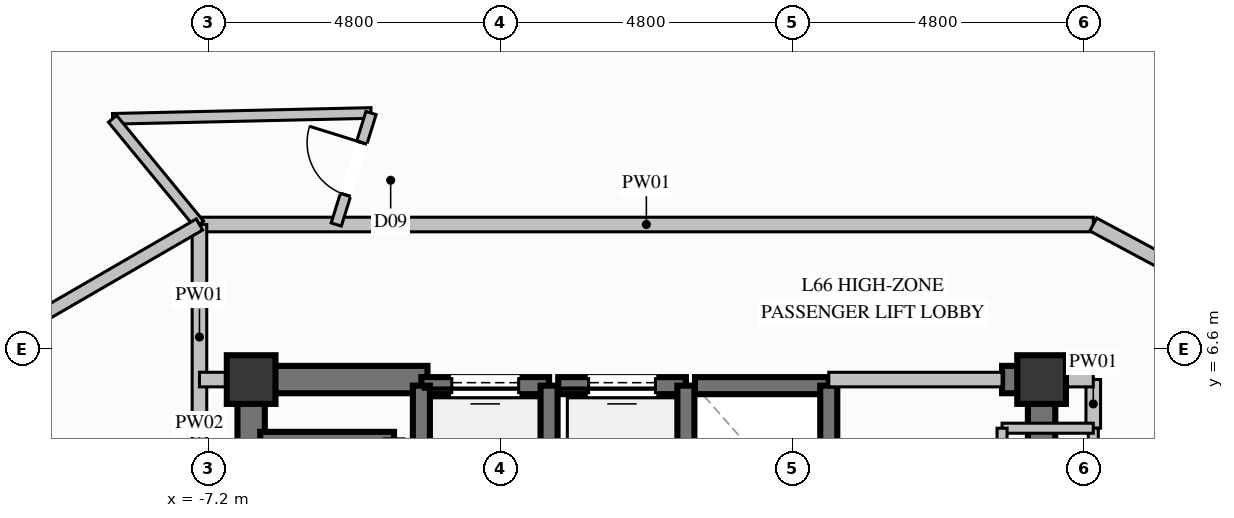
"""IFC4 building model, lengths in metres.
Left out: names, types, materials, properties, quantities, classifications, styles, units other than length and angle.
Written with IfcOpenShell. Run it as: python <this file> out.ifc"""

import sys

from ifc_helpers import new_model, si_unit, direction, frame, frame_2d, origin, origin_2d, place, context, subcontext, project, spatial, rectangle, extrude, element, fill, save


model = new_model("IFC4")
c1 = context("Model", 3, precision=1e-05, world=origin(), true_north=direction((0.0, 1.0)))
c2 = subcontext(c1, "Body", "Model", "MODEL_VIEW")
j1 = project(units=[si_unit("LENGTHUNIT", "METRE"), si_unit("PLANEANGLEUNIT", "RADIAN")], contexts=[c1])
p1 = place(None, origin())
s1 = spatial("IfcSite", under=j1, at=p1, CompositionType="ELEMENT")
p2 = place(p1, origin())
s2 = spatial("IfcBuilding", under=s1, at=p2, CompositionType="ELEMENT")
p3 = place(p2, frame((0.0, 0.0, 254.4)))
s3 = spatial("IfcBuildingStorey", under=s2, at=p3, CompositionType="ELEMENT", Elevation=254.4)
for number, where, z_axis, x_axis in (
    (1, (6.5, 6.1, 0.0), (0.0, 0.0, 1.0), (1.0, 0.0, 0.0)),
    (2, (-6.5, 6.1, 0.0), (0.0, 0.0, 1.0), (1.0, 0.0, 0.0)),
):
    element("IfcColumn", number, at=place(p3, frame(where, z_axis=z_axis, x_axis=x_axis)), inside=s3, PredefinedType="COLUMN", context=c2, shape_type="SweptSolid", body=[
        extrude(rectangle(XDim=0.8, YDim=0.8, at=origin_2d()), origin(), (0.0, 0.0, 1.0), 3.8),
    ])
p4 = place(p3, frame((-6.275, 6.1, 0.0), z_axis=(0.0, 0.0, 1.0), x_axis=(1.0, 0.0, 0.0)))
e3 = element("IfcWall", 3, at=p4, inside=s3, PredefinedType="SHEAR", context=c2, shape_type="SweptSolid", body=[
    extrude(rectangle(XDim=2.675, YDim=0.45, at=frame_2d((1.337, 0.0))), origin(), (0.0, 0.0, 1.0), 3.8),
])
p5 = place(p3, frame((5.85, 6.1, 0.0), z_axis=(0.0, 0.0, 1.0), x_axis=(1.0, 0.0, 0.0)))
e4 = element("IfcWall", 4, at=p5, inside=s3, PredefinedType="SHEAR", context=c2, shape_type="SweptSolid", body=[
    extrude(rectangle(XDim=0.425, YDim=0.45, at=frame_2d((0.212, 0.0))), origin(), (0.0, 0.0, 1.0), 3.8),
])
p6 = place(p3, frame((-6.5, 2.35, 0.0), z_axis=(0.0, 0.0, 1.0), x_axis=(0.0, 1.0, 0.0)))
e5 = element("IfcWall", 5, at=p6, inside=s3, PredefinedType="SHEAR", context=c2, shape_type="SweptSolid", body=[
    extrude(rectangle(XDim=3.975, YDim=0.45, at=frame_2d((1.987, 0.0))), origin(), (0.0, 0.0, 1.0), 3.8),
])
p7 = place(p3, frame((6.5, 3.35, 0.0), z_axis=(0.0, 0.0, 1.0), x_axis=(0.0, 1.0, 0.0)))
e6 = element("IfcWall", 6, at=p7, inside=s3, PredefinedType="SHEAR", context=c2, shape_type="SweptSolid", body=[
    extrude(rectangle(XDim=2.975, YDim=0.45, at=frame_2d((1.487, 0.0))), origin(), (0.0, 0.0, 1.0), 3.8),
])
p8 = place(p3, frame((-1.6, 6.0, 0.0), z_axis=(0.0, 0.0, 1.0), x_axis=(-1.0, 0.0, 0.0)))
e7 = element("IfcWall", 7, at=p8, inside=s3, PredefinedType="SOLIDWALL", context=c2, shape_type="SweptSolid", body=[
    extrude(rectangle(XDim=2.1, YDim=0.28, at=frame_2d((1.05, 0.0))), origin(), (0.0, 0.0, 1.0), 3.57),
])
p9 = place(p8, frame((0.5, 0.0, 0.0)))
e8 = element("IfcOpeningElement", 8, at=p9, cuts=e7, PredefinedType="OPENING", context=c2, shape_type="SweptSolid", body=[
    extrude(rectangle(XDim=1.1, YDim=2.2, at=frame_2d((0.55, 1.1))), frame((0.0, 0.15, 0.0), z_axis=(0.0, -1.0, 0.0), x_axis=(1.0, 0.0, 0.0)), (0.0, 0.0, 1.0), 0.3),
])
for number, where, z_axis, x_axis in (
    (9, (-3.7, 6.0, 0.0), (0.0, 0.0, 1.0), (0.0, -1.0, 0.0)),
    (10, (-1.6, 3.5, 0.0), (0.0, 0.0, 1.0), (0.0, 1.0, 0.0)),
):
    element("IfcWall", number, at=place(p3, frame(where, z_axis=z_axis, x_axis=x_axis)), inside=s3, PredefinedType="SOLIDWALL", context=c2, shape_type="SweptSolid", body=[
        extrude(rectangle(XDim=2.5, YDim=0.28, at=frame_2d((1.25, 0.0))), origin(), (0.0, 0.0, 1.0), 3.57),
    ])
p10 = place(p3, frame((0.65, 6.0, 0.0), z_axis=(0.0, 0.0, 1.0), x_axis=(-1.0, 0.0, 0.0)))
e11 = element("IfcWall", 11, at=p10, inside=s3, PredefinedType="SOLIDWALL", context=c2, shape_type="SweptSolid", body=[
    extrude(rectangle(XDim=2.1, YDim=0.28, at=frame_2d((1.05, 0.0))), origin(), (0.0, 0.0, 1.0), 3.57),
])
p11 = place(p10, frame((0.5, 0.0, 0.0)))
e12 = element("IfcOpeningElement", 12, at=p11, cuts=e11, PredefinedType="OPENING", context=c2, shape_type="SweptSolid", body=[
    extrude(rectangle(XDim=1.1, YDim=2.2, at=frame_2d((0.55, 1.1))), frame((0.0, 0.15, 0.0), z_axis=(0.0, -1.0, 0.0), x_axis=(1.0, 0.0, 0.0)), (0.0, 0.0, 1.0), 0.3),
])
p12 = place(p3, frame((0.65, 3.5, 0.0), z_axis=(0.0, 0.0, 1.0), x_axis=(0.0, 1.0, 0.0)))
e13 = element("IfcWall", 13, at=p12, inside=s3, PredefinedType="SOLIDWALL", context=c2, shape_type="SweptSolid", body=[
    extrude(rectangle(XDim=2.5, YDim=0.28, at=frame_2d((1.25, 0.0))), origin(), (0.0, 0.0, 1.0), 3.57),
])
p13 = place(p3, frame((3.0, 6.0, 0.0), z_axis=(0.0, 0.0, 1.0), x_axis=(-1.0, 0.0, 0.0)))
e14 = element("IfcWall", 14, at=p13, inside=s3, PredefinedType="SOLIDWALL", context=c2, shape_type="SweptSolid", body=[
    extrude(rectangle(XDim=2.2, YDim=0.28, at=frame_2d((1.1, 0.0))), origin(), (0.0, 0.0, 1.0), 3.57),
])
p14 = place(p3, frame((3.0, 3.5, 0.0), z_axis=(0.0, 0.0, 1.0), x_axis=(0.0, 1.0, 0.0)))
e15 = element("IfcWall", 15, at=p14, inside=s3, PredefinedType="SOLIDWALL", context=c2, shape_type="SweptSolid", body=[
    extrude(rectangle(XDim=2.5, YDim=0.28, at=frame_2d((1.25, 0.0))), origin(), (0.0, 0.0, 1.0), 3.57),
])
p15 = place(p3, frame((-4.15, 5.1, 0.0), z_axis=(0.0, 0.0, 1.0), x_axis=(-1.0, 0.0, 0.0)))
e16 = element("IfcWall", 16, at=p15, inside=s3, PredefinedType="SOLIDWALL", context=c2, shape_type="SweptSolid", body=[
    extrude(rectangle(XDim=2.2, YDim=0.28, at=frame_2d((1.1, 0.0))), origin(), (0.0, 0.0, 1.0), 3.57),
])
p16 = place(p3, frame((-7.35, 8.65, 0.0), z_axis=(0.0, 0.0, 1.0), x_axis=(1.0, 0.0, 0.0)))
e17 = element("IfcWall", 17, at=p16, inside=s3, PredefinedType="PARTITIONING", context=c2, shape_type="SweptSolid", body=[
    extrude(rectangle(XDim=14.7, YDim=0.24, at=frame_2d((7.35, 0.0))), origin(), (0.0, 0.0, 1.0), 3.57),
])
p17 = place(p3, frame((3.0, 6.1, 0.0), z_axis=(0.0, 0.0, 1.0), x_axis=(1.0, 0.0, 0.0)))
e18 = element("IfcWall", 18, at=p17, inside=s3, PredefinedType="PARTITIONING", context=c2, shape_type="SweptSolid", body=[
    extrude(rectangle(XDim=2.85, YDim=0.24, at=frame_2d((1.425, 0.0))), origin(), (0.0, 0.0, 1.0), 2.655),
])
p18 = place(p3, frame((7.35, 5.3, 0.0), z_axis=(0.0, 0.0, 1.0), x_axis=(0.0, 1.0, 0.0)))
e19 = element("IfcWall", 19, at=p18, inside=s3, PredefinedType="PARTITIONING", context=c2, shape_type="SweptSolid", body=[
    extrude(rectangle(XDim=0.8, YDim=0.24, at=frame_2d((0.4, 0.0))), origin(), (0.0, 0.0, 1.0), 2.655),
])
p19 = place(p3, frame((6.5, 6.1, 0.0), z_axis=(0.0, 0.0, 1.0), x_axis=(1.0, 0.0, 0.0)))
e20 = element("IfcWall", 20, at=p19, inside=s3, PredefinedType="PARTITIONING", context=c2, shape_type="SweptSolid", body=[
    extrude(rectangle(XDim=0.85, YDim=0.24, at=frame_2d((0.425, 0.0))), origin(), (0.0, 0.0, 1.0), 3.011),
])
p20 = place(p3, frame((-7.35, 4.95, 0.0), z_axis=(0.0, 0.0, 1.0), x_axis=(0.0, 1.0, 0.0)))
e21 = element("IfcWall", 21, at=p20, inside=s3, PredefinedType="PARTITIONING", context=c2, shape_type="SweptSolid", body=[
    extrude(rectangle(XDim=3.7, YDim=0.24, at=frame_2d((1.85, 0.0))), origin(), (0.0, 0.0, 1.0), 2.655),
])
p21 = place(p3, frame((-7.35, 6.1, 0.0), z_axis=(0.0, 0.0, 1.0), x_axis=(1.0, 0.0, 0.0)))
e22 = element("IfcWall", 22, at=p21, inside=s3, PredefinedType="PARTITIONING", context=c2, shape_type="SweptSolid", body=[
    extrude(rectangle(XDim=0.85, YDim=0.24, at=frame_2d((0.425, 0.0))), origin(), (0.0, 0.0, 1.0), 3.011),
])
p22 = place(p3, frame((7.35, 3.35, 0.0), z_axis=(0.0, 0.0, 1.0), x_axis=(0.0, 1.0, 0.0)))
e23 = element("IfcWall", 23, at=p22, inside=s3, PredefinedType="PARTITIONING", context=c2, shape_type="SweptSolid", body=[
    extrude(rectangle(XDim=1.95, YDim=0.165, at=frame_2d((0.975, 0.0))), origin(), (0.0, 0.0, 1.0), 3.57),
])
p23 = place(p22, frame((0.5, 0.0, 0.0)))
e24 = element("IfcOpeningElement", 24, at=p23, cuts=e23, PredefinedType="OPENING", context=c2, shape_type="SweptSolid", body=[
    extrude(rectangle(XDim=0.95, YDim=2.1, at=frame_2d((0.475, 1.05))), frame((0.0, 0.093, 0.0), z_axis=(0.0, -1.0, 0.0), x_axis=(1.0, 0.0, 0.0)), (0.0, 0.0, 1.0), 0.185),
])
p24 = place(p3, frame((7.35, 5.3, 0.0), z_axis=(0.0, 0.0, 1.0), x_axis=(-1.0, 0.0, 0.0)))
e25 = element("IfcWall", 25, at=p24, inside=s3, PredefinedType="PARTITIONING", context=c2, shape_type="SweptSolid", body=[
    extrude(rectangle(XDim=1.5, YDim=0.165, at=frame_2d((0.75, 0.0))), origin(), (0.0, 0.0, 1.0), 2.655),
])
p25 = place(p3, frame((5.85, 5.3, 0.0), z_axis=(0.0, 0.0, 1.0), x_axis=(0.0, -1.0, 0.0)))
e26 = element("IfcWall", 26, at=p25, inside=s3, PredefinedType="PARTITIONING", context=c2, shape_type="SweptSolid", body=[
    extrude(rectangle(XDim=1.95, YDim=0.165, at=frame_2d((0.975, 0.0))), origin(), (0.0, 0.0, 1.0), 2.655),
])
p26 = place(p3, frame((-8.779, 10.388, 0.0), z_axis=(0.0, 0.0, 1.0), x_axis=(0.999745380364, 0.022564894009, 0.0)))
e27 = element("IfcWall", 27, at=p26, inside=s3, PredefinedType="PLUMBINGWALL", context=c2, shape_type="SweptSolid", body=[
    extrude(rectangle(XDim=4.252, YDim=0.175, at=frame_2d((2.126, 0.0))), origin(), (0.0, 0.0, 1.0), 3.57),
])
p27 = place(p3, frame((-8.779, 10.388, 0.0), z_axis=(0.0, 0.0, 1.0), x_axis=(0.635079503828, -0.772446777337, 0.0)))
e28 = element("IfcWall", 28, at=p27, inside=s3, PredefinedType="PLUMBINGWALL", context=c2, shape_type="SweptSolid", body=[
    extrude(rectangle(XDim=2.25, YDim=0.175, at=frame_2d((1.125, 0.0))), origin(), (0.0, 0.0, 1.0), 3.57),
])
p28 = place(p3, frame((-5.1, 8.65, 0.0), z_axis=(0.0, 0.0, 1.0), x_axis=(0.297753956274, 0.95464264598, 0.0)))
e29 = element("IfcWall", 29, at=p28, inside=s3, PredefinedType="PLUMBINGWALL", context=c2, shape_type="SweptSolid", body=[
    extrude(rectangle(XDim=1.921, YDim=0.175, at=frame_2d((0.96, 0.0))), origin(), (0.0, 0.0, 1.0), 3.57),
])
p29 = place(p28, frame((0.511, 0.0, 0.0)))
e30 = element("IfcOpeningElement", 30, at=p29, cuts=e29, PredefinedType="OPENING", context=c2, shape_type="SweptSolid", body=[
    extrude(rectangle(XDim=0.9, YDim=2.1, at=frame_2d((0.45, 1.05))), frame((0.0, 0.098, 0.0), z_axis=(0.0, -1.0, 0.0), x_axis=(1.0, 0.0, 0.0)), (0.0, 0.0, 1.0), 0.195),
])
p30 = place(p3, frame((-11.065, 6.5, 0.0), z_axis=(0.0, 0.0, 1.0), x_axis=(0.865506757898, 0.50089724698, 0.0)))
e31 = element("IfcWall", 31, at=p30, inside=s3, PredefinedType="PARTITIONING", context=c2, shape_type="SweptSolid", body=[
    extrude(rectangle(XDim=4.292, YDim=0.21, at=frame_2d((2.146, 0.0))), origin(), (0.0, 0.0, 1.0), 3.57),
])
p31 = place(p3, frame((7.35, 8.65, 0.0), z_axis=(0.0, 0.0, 1.0), x_axis=(0.881565227264, -0.472062231151, 0.0)))
e32 = element("IfcWall", 32, at=p31, inside=s3, PredefinedType="PARTITIONING", context=c2, shape_type="SweptSolid", body=[
    extrude(rectangle(XDim=4.554, YDim=0.24, at=frame_2d((2.277, 0.0))), origin(), (0.0, 0.0, 1.0), 3.57),
])
p32 = place(p31, frame((1.777, 0.0, 0.0)))
e33 = element("IfcOpeningElement", 33, at=p32, cuts=e32, PredefinedType="OPENING", context=c2, shape_type="SweptSolid", body=[
    extrude(rectangle(XDim=1.0, YDim=2.2, at=frame_2d((0.5, 1.1))), frame((0.0, 0.13, 0.0), z_axis=(0.0, -1.0, 0.0), x_axis=(1.0, 0.0, 0.0)), (0.0, 0.0, 1.0), 0.26),
])
p33 = place(p9, origin())
e34 = element("IfcDoor", 34, at=p33, inside=s3, OperationType="SLIDING_TO_LEFT", PredefinedType="DOOR", context=c2, shape_type="SweptSolid", body=[
    extrude(rectangle(XDim=1.1, YDim=2.2, at=frame_2d((0.55, 1.1))), frame((0.0, 0.025, 0.0), z_axis=(0.0, -1.0, 0.0), x_axis=(1.0, 0.0, 0.0)), (0.0, 0.0, 1.0), 0.05),
])
fill(e8, e34)
p34 = place(p11, origin())
e35 = element("IfcDoor", 35, at=p34, inside=s3, OperationType="SLIDING_TO_LEFT", PredefinedType="DOOR", context=c2, shape_type="SweptSolid", body=[
    extrude(rectangle(XDim=1.1, YDim=2.2, at=frame_2d((0.55, 1.1))), frame((0.0, 0.025, 0.0), z_axis=(0.0, -1.0, 0.0), x_axis=(1.0, 0.0, 0.0)), (0.0, 0.0, 1.0), 0.05),
])
fill(e12, e35)
p35 = place(p29, origin())
e36 = element("IfcDoor", 36, at=p35, inside=s3, OperationType="SINGLE_SWING_RIGHT", PredefinedType="DOOR", context=c2, shape_type="SweptSolid", body=[
    extrude(rectangle(XDim=0.9, YDim=2.1, at=frame_2d((0.45, 1.05))), frame((0.0, 0.025, 0.0), z_axis=(0.0, -1.0, 0.0), x_axis=(1.0, 0.0, 0.0)), (0.0, 0.0, 1.0), 0.05),
])
fill(e30, e36)
save(model, sys.argv[1])
